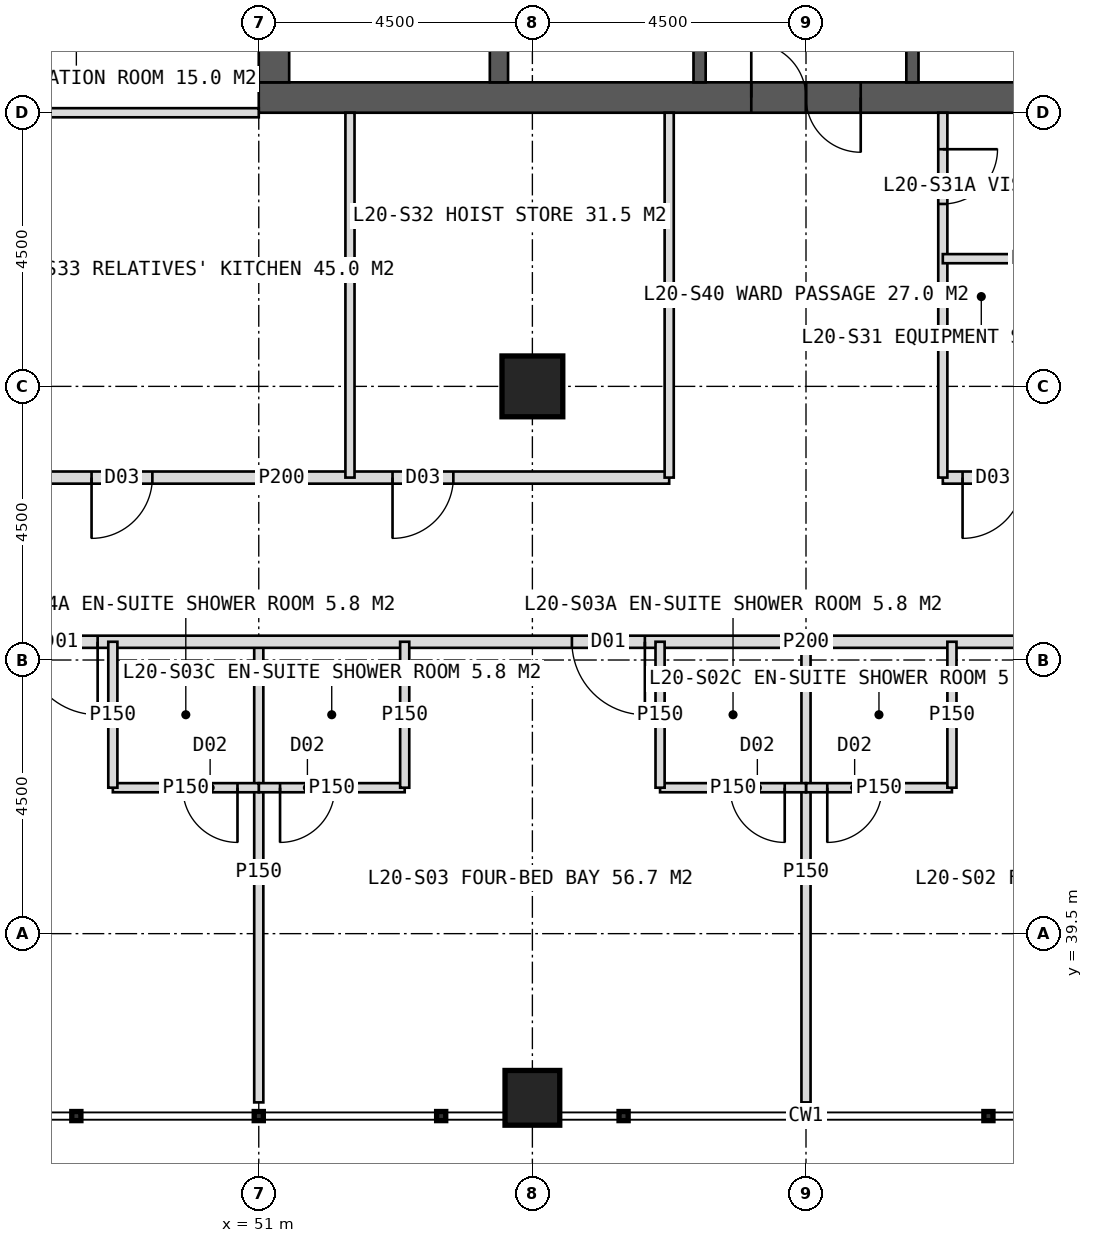
"""IFC4 building model, lengths in metres.
Left out: names, types, materials, properties, quantities, classifications, styles, units other than length and angle.
Written with IfcOpenShell. Run it as: python <this file> out.ifc"""

import sys

from ifc_helpers import new_model, si_unit, direction, frame, frame_2d, origin, origin_2d, place, context, subcontext, project, spatial, rectangle, hollow_rectangle, extrude, element, fill, save


model = new_model("IFC4")
c1 = context("Model", 3, precision=1e-05, world=origin(), true_north=direction((0.0, 1.0)))
c2 = subcontext(c1, "Body", "Model", "MODEL_VIEW")
j1 = project(units=[si_unit("LENGTHUNIT", "METRE"), si_unit("PLANEANGLEUNIT", "RADIAN")], contexts=[c1])
p1 = place(None, origin())
s1 = spatial("IfcSite", under=j1, at=p1, CompositionType="ELEMENT")
p2 = place(p1, origin())
s2 = spatial("IfcBuilding", under=s1, at=p2, CompositionType="ELEMENT")
p3 = place(p2, frame((0.0, 0.0, 87.0)))
s3 = spatial("IfcBuildingStorey", under=s2, at=p3, CompositionType="ELEMENT", Elevation=87.0)
p4 = place(p3, frame((51.0, 53.25, 0.0), z_axis=(0.0, 0.0, 1.0), x_axis=(1.0, 0.0, 0.0)))
e1 = element("IfcWall", 1, at=p4, inside=s3, PredefinedType="SHEAR", context=c2, shape_type="SweptSolid", body=[
    extrude(rectangle(XDim=18.0, YDim=0.5, at=frame_2d((9.0, 0.0))), origin(), (0.0, 0.0, 1.0), 4.0),
])
p5 = place(p4, frame((8.1, 0.0, 0.0)))
e2 = element("IfcOpeningElement", 2, at=p5, cuts=e1, PredefinedType="OPENING", context=c2, shape_type="SweptSolid", body=[
    extrude(rectangle(XDim=1.8, YDim=2.2, at=frame_2d((0.9, 1.1))), frame((0.0, 0.26, 0.0), z_axis=(0.0, -1.0, 0.0), x_axis=(1.0, 0.0, 0.0)), (0.0, 0.0, 1.0), 0.52),
])
p6 = place(p3, frame((51.25, 53.5, 0.0), z_axis=(0.0, 0.0, 1.0), x_axis=(0.0, 1.0, 0.0)))
e3 = element("IfcWall", 3, at=p6, inside=s3, PredefinedType="SHEAR", context=c2, shape_type="SweptSolid", body=[
    extrude(rectangle(XDim=17.0, YDim=0.5, at=frame_2d((8.5, 0.0))), origin(), (0.0, 0.0, 1.0), 4.0),
])
p7 = place(p6, frame((6.0, 0.0, 0.0)))
e4 = element("IfcOpeningElement", 4, at=p7, cuts=e3, PredefinedType="OPENING", context=c2, shape_type="SweptSolid", body=[
    extrude(rectangle(XDim=1.5, YDim=2.2, at=frame_2d((0.75, 1.1))), frame((0.0, 0.26, 0.0), z_axis=(0.0, -1.0, 0.0), x_axis=(1.0, 0.0, 0.0)), (0.0, 0.0, 1.0), 0.52),
])
p8 = place(p3, frame((54.95, 53.5, 0.0), z_axis=(0.0, 0.0, 1.0), x_axis=(0.0, 1.0, 0.0)))
e5 = element("IfcWall", 5, at=p8, inside=s3, PredefinedType="SHEAR", context=c2, shape_type="SweptSolid", body=[
    extrude(rectangle(XDim=17.0, YDim=0.3, at=frame_2d((8.5, 0.0))), origin(), (0.0, 0.0, 1.0), 4.0),
])
p9 = place(p3, frame((58.25, 53.5, 0.0), z_axis=(0.0, 0.0, 1.0), x_axis=(0.0, 1.0, 0.0)))
e6 = element("IfcWall", 6, at=p9, inside=s3, PredefinedType="SHEAR", context=c2, shape_type="SweptSolid", body=[
    extrude(rectangle(XDim=17.0, YDim=0.2, at=frame_2d((8.5, 0.0))), origin(), (0.0, 0.0, 1.0), 4.0),
])
p10 = place(p9, frame((1.375, 0.0, 0.0)))
e7 = element("IfcOpeningElement", 7, at=p10, cuts=e6, PredefinedType="OPENING", context=c2, shape_type="SweptSolid", body=[
    extrude(rectangle(XDim=1.4, YDim=2.2, at=frame_2d((0.7, 1.1))), frame((0.0, 0.11, 0.0), z_axis=(0.0, -1.0, 0.0), x_axis=(1.0, 0.0, 0.0)), (0.0, 0.0, 1.0), 0.22),
])
p11 = place(p9, frame((5.675, 0.0, 0.0)))
e8 = element("IfcOpeningElement", 8, at=p11, cuts=e6, PredefinedType="OPENING", context=c2, shape_type="SweptSolid", body=[
    extrude(rectangle(XDim=1.4, YDim=2.2, at=frame_2d((0.7, 1.1))), frame((0.0, 0.11, 0.0), z_axis=(0.0, -1.0, 0.0), x_axis=(1.0, 0.0, 0.0)), (0.0, 0.0, 1.0), 0.22),
])
p12 = place(p3, frame((61.75, 53.5, 0.0), z_axis=(0.0, 0.0, 1.0), x_axis=(0.0, 1.0, 0.0)))
e9 = element("IfcWall", 9, at=p12, inside=s3, PredefinedType="SHEAR", context=c2, shape_type="SweptSolid", body=[
    extrude(rectangle(XDim=17.0, YDim=0.2, at=frame_2d((8.5, 0.0))), origin(), (0.0, 0.0, 1.0), 4.0),
])
p13 = place(p12, frame((1.375, 0.0, 0.0)))
e10 = element("IfcOpeningElement", 10, at=p13, cuts=e9, PredefinedType="OPENING", context=c2, shape_type="SweptSolid", body=[
    extrude(rectangle(XDim=1.4, YDim=2.2, at=frame_2d((0.7, 1.1))), frame((0.0, 0.11, 0.0), z_axis=(0.0, -1.0, 0.0), x_axis=(1.0, 0.0, 0.0)), (0.0, 0.0, 1.0), 0.22),
])
p14 = place(p12, frame((5.675, 0.0, 0.0)))
e11 = element("IfcOpeningElement", 11, at=p14, cuts=e9, PredefinedType="OPENING", context=c2, shape_type="SweptSolid", body=[
    extrude(rectangle(XDim=1.4, YDim=2.2, at=frame_2d((0.7, 1.1))), frame((0.0, 0.11, 0.0), z_axis=(0.0, -1.0, 0.0), x_axis=(1.0, 0.0, 0.0)), (0.0, 0.0, 1.0), 0.22),
])
p15 = place(p3, frame((55.5, 48.5, 0.0), z_axis=(0.0, 0.0, 1.0), x_axis=(1.0, 0.0, 0.0)))
e12 = element("IfcColumn", 12, at=p15, inside=s3, PredefinedType="COLUMN", context=c2, shape_type="SweptSolid", body=[
    extrude(hollow_rectangle(XDim=1.0, YDim=1.0, WallThickness=0.1, at=origin_2d()), origin(), (0.0, 0.0, 1.0), 4.0),
])
p16 = place(p3, frame((55.5, 36.8, 0.0), z_axis=(0.0, 0.0, 1.0), x_axis=(1.0, 0.0, 0.0)))
e13 = element("IfcColumn", 13, at=p16, inside=s3, PredefinedType="COLUMN", context=c2, shape_type="SweptSolid", body=[
    extrude(hollow_rectangle(XDim=0.9, YDim=0.9, WallThickness=0.08, at=origin_2d()), origin(), (0.0, 0.0, 1.0), 4.0),
])
p17 = place(p3, frame((51.0, 53.0, 0.0), z_axis=(0.0, 0.0, 1.0), x_axis=(-1.0, 0.0, 0.0)))
e14 = element("IfcWall", 14, at=p17, inside=s3, PredefinedType="PARTITIONING", context=c2, shape_type="SweptSolid", body=[
    extrude(rectangle(XDim=6.0, YDim=0.15, at=frame_2d((3.0, 0.0))), origin(), (0.0, 0.0, 1.0), 3.75),
])
p18 = place(p3, frame((60.0, 44.3, 0.0), z_axis=(0.0, 0.0, 1.0), x_axis=(0.0, -1.0, 0.0)))
e15 = element("IfcWall", 15, at=p18, inside=s3, PredefinedType="PARTITIONING", context=c2, shape_type="SweptSolid", body=[
    extrude(rectangle(XDim=7.575, YDim=0.15, at=frame_2d((3.788, 0.0))), origin(), (0.0, 0.0, 1.0), 2.75),
])
p19 = place(p3, frame((51.0, 44.3, 0.0), z_axis=(0.0, 0.0, 1.0), x_axis=(0.0, -1.0, 0.0)))
e16 = element("IfcWall", 16, at=p19, inside=s3, PredefinedType="PARTITIONING", context=c2, shape_type="SweptSolid", body=[
    extrude(rectangle(XDim=7.575, YDim=0.15, at=frame_2d((3.788, 0.0))), origin(), (0.0, 0.0, 1.0), 3.75),
])
p20 = place(p3, frame((77.7, 44.3, 0.0), z_axis=(0.0, 0.0, 1.0), x_axis=(-1.0, 0.0, 0.0)))
e17 = element("IfcWall", 17, at=p20, inside=s3, PredefinedType="PARTITIONING", context=c2, shape_type="SweptSolid", body=[
    extrude(rectangle(XDim=35.4, YDim=0.2, at=frame_2d((17.7, 0.0))), origin(), (0.0, 0.0, 1.0), 3.75),
])
p21 = place(p20, frame((2.65, 0.0, 0.0)))
e18 = element("IfcOpeningElement", 18, at=p21, cuts=e17, PredefinedType="OPENING", context=c2, shape_type="SweptSolid", body=[
    extrude(rectangle(XDim=1.2, YDim=2.2, at=frame_2d((0.6, 1.1))), frame((0.0, 0.11, 0.0), z_axis=(0.0, -1.0, 0.0), x_axis=(1.0, 0.0, 0.0)), (0.0, 0.0, 1.0), 0.22),
])
p22 = place(p20, frame((11.35, 0.0, 0.0)))
e19 = element("IfcOpeningElement", 19, at=p22, cuts=e17, PredefinedType="OPENING", context=c2, shape_type="SweptSolid", body=[
    extrude(rectangle(XDim=1.2, YDim=2.2, at=frame_2d((0.6, 1.1))), frame((0.0, 0.11, 0.0), z_axis=(0.0, -1.0, 0.0), x_axis=(1.0, 0.0, 0.0)), (0.0, 0.0, 1.0), 0.22),
])
p23 = place(p20, frame((20.35, 0.0, 0.0)))
e20 = element("IfcOpeningElement", 20, at=p23, cuts=e17, PredefinedType="OPENING", context=c2, shape_type="SweptSolid", body=[
    extrude(rectangle(XDim=1.2, YDim=2.2, at=frame_2d((0.6, 1.1))), frame((0.0, 0.11, 0.0), z_axis=(0.0, -1.0, 0.0), x_axis=(1.0, 0.0, 0.0)), (0.0, 0.0, 1.0), 0.22),
])
p24 = place(p20, frame((29.35, 0.0, 0.0)))
e21 = element("IfcOpeningElement", 21, at=p24, cuts=e17, PredefinedType="OPENING", context=c2, shape_type="SweptSolid", body=[
    extrude(rectangle(XDim=1.2, YDim=2.2, at=frame_2d((0.6, 1.1))), frame((0.0, 0.11, 0.0), z_axis=(0.0, -1.0, 0.0), x_axis=(1.0, 0.0, 0.0)), (0.0, 0.0, 1.0), 0.22),
])
p25 = place(p3, frame((62.4, 41.9, 0.0), z_axis=(0.0, 0.0, 1.0), x_axis=(-1.0, 0.0, 0.0)))
e22 = element("IfcWall", 22, at=p25, inside=s3, PredefinedType="PARTITIONING", context=c2, shape_type="SweptSolid", body=[
    extrude(rectangle(XDim=2.4, YDim=0.15, at=frame_2d((1.2, 0.0))), origin(), (0.0, 0.0, 1.0), 3.75),
])
p26 = place(p25, frame((1.15, 0.0, 0.0)))
e23 = element("IfcOpeningElement", 23, at=p26, cuts=e22, PredefinedType="OPENING", context=c2, shape_type="SweptSolid", body=[
    extrude(rectangle(XDim=0.9, YDim=2.1, at=frame_2d((0.45, 1.05))), frame((0.0, 0.085, 0.0), z_axis=(0.0, -1.0, 0.0), x_axis=(1.0, 0.0, 0.0)), (0.0, 0.0, 1.0), 0.17),
])
p27 = place(p3, frame((62.4, 44.3, 0.0), z_axis=(0.0, 0.0, 1.0), x_axis=(0.0, -1.0, 0.0)))
e24 = element("IfcWall", 24, at=p27, inside=s3, PredefinedType="PARTITIONING", context=c2, shape_type="SweptSolid", body=[
    extrude(rectangle(XDim=2.4, YDim=0.15, at=frame_2d((1.2, 0.0))), origin(), (0.0, 0.0, 1.0), 3.75),
])
p28 = place(p3, frame((60.0, 41.9, 0.0), z_axis=(0.0, 0.0, 1.0), x_axis=(-1.0, 0.0, 0.0)))
e25 = element("IfcWall", 25, at=p28, inside=s3, PredefinedType="PARTITIONING", context=c2, shape_type="SweptSolid", body=[
    extrude(rectangle(XDim=2.4, YDim=0.15, at=frame_2d((1.2, 0.0))), origin(), (0.0, 0.0, 1.0), 3.75),
])
p29 = place(p28, frame((0.35, 0.0, 0.0)))
e26 = element("IfcOpeningElement", 26, at=p29, cuts=e25, PredefinedType="OPENING", context=c2, shape_type="SweptSolid", body=[
    extrude(rectangle(XDim=0.9, YDim=2.1, at=frame_2d((0.45, 1.05))), frame((0.0, 0.085, 0.0), z_axis=(0.0, -1.0, 0.0), x_axis=(1.0, 0.0, 0.0)), (0.0, 0.0, 1.0), 0.17),
])
p30 = place(p3, frame((57.6, 44.3, 0.0), z_axis=(0.0, 0.0, 1.0), x_axis=(0.0, -1.0, 0.0)))
e27 = element("IfcWall", 27, at=p30, inside=s3, PredefinedType="PARTITIONING", context=c2, shape_type="SweptSolid", body=[
    extrude(rectangle(XDim=2.4, YDim=0.15, at=frame_2d((1.2, 0.0))), origin(), (0.0, 0.0, 1.0), 3.75),
])
p31 = place(p3, frame((53.4, 41.9, 0.0), z_axis=(0.0, 0.0, 1.0), x_axis=(-1.0, 0.0, 0.0)))
e28 = element("IfcWall", 28, at=p31, inside=s3, PredefinedType="PARTITIONING", context=c2, shape_type="SweptSolid", body=[
    extrude(rectangle(XDim=2.4, YDim=0.15, at=frame_2d((1.2, 0.0))), origin(), (0.0, 0.0, 1.0), 3.75),
])
p32 = place(p31, frame((1.15, 0.0, 0.0)))
e29 = element("IfcOpeningElement", 29, at=p32, cuts=e28, PredefinedType="OPENING", context=c2, shape_type="SweptSolid", body=[
    extrude(rectangle(XDim=0.9, YDim=2.1, at=frame_2d((0.45, 1.05))), frame((0.0, 0.085, 0.0), z_axis=(0.0, -1.0, 0.0), x_axis=(1.0, 0.0, 0.0)), (0.0, 0.0, 1.0), 0.17),
])
p33 = place(p3, frame((53.4, 44.3, 0.0), z_axis=(0.0, 0.0, 1.0), x_axis=(0.0, -1.0, 0.0)))
e30 = element("IfcWall", 30, at=p33, inside=s3, PredefinedType="PARTITIONING", context=c2, shape_type="SweptSolid", body=[
    extrude(rectangle(XDim=2.4, YDim=0.15, at=frame_2d((1.2, 0.0))), origin(), (0.0, 0.0, 1.0), 3.75),
])
p34 = place(p3, frame((51.0, 41.9, 0.0), z_axis=(0.0, 0.0, 1.0), x_axis=(-1.0, 0.0, 0.0)))
e31 = element("IfcWall", 31, at=p34, inside=s3, PredefinedType="PARTITIONING", context=c2, shape_type="SweptSolid", body=[
    extrude(rectangle(XDim=2.4, YDim=0.15, at=frame_2d((1.2, 0.0))), origin(), (0.0, 0.0, 1.0), 3.75),
])
p35 = place(p34, frame((0.35, 0.0, 0.0)))
e32 = element("IfcOpeningElement", 32, at=p35, cuts=e31, PredefinedType="OPENING", context=c2, shape_type="SweptSolid", body=[
    extrude(rectangle(XDim=0.9, YDim=2.1, at=frame_2d((0.45, 1.05))), frame((0.0, 0.085, 0.0), z_axis=(0.0, -1.0, 0.0), x_axis=(1.0, 0.0, 0.0)), (0.0, 0.0, 1.0), 0.17),
])
p36 = place(p3, frame((48.6, 44.3, 0.0), z_axis=(0.0, 0.0, 1.0), x_axis=(0.0, -1.0, 0.0)))
e33 = element("IfcWall", 33, at=p36, inside=s3, PredefinedType="PARTITIONING", context=c2, shape_type="SweptSolid", body=[
    extrude(rectangle(XDim=2.4, YDim=0.15, at=frame_2d((1.2, 0.0))), origin(), (0.0, 0.0, 1.0), 3.75),
])
p37 = place(p3, frame((75.0, 47.0, 0.0), z_axis=(0.0, 0.0, 1.0), x_axis=(-1.0, 0.0, 0.0)))
e34 = element("IfcWall", 34, at=p37, inside=s3, PredefinedType="PARTITIONING", context=c2, shape_type="SweptSolid", body=[
    extrude(rectangle(XDim=12.75, YDim=0.2, at=frame_2d((6.375, 0.0))), origin(), (0.0, 0.0, 1.0), 3.75),
])
p38 = place(p37, frame((7.0, 0.0, 0.0)))
e35 = element("IfcOpeningElement", 35, at=p38, cuts=e34, PredefinedType="OPENING", context=c2, shape_type="SweptSolid", body=[
    extrude(rectangle(XDim=1.0, YDim=2.1, at=frame_2d((0.5, 1.05))), frame((0.0, 0.11, 0.0), z_axis=(0.0, -1.0, 0.0), x_axis=(1.0, 0.0, 0.0)), (0.0, 0.0, 1.0), 0.22),
])
p39 = place(p37, frame((11.425, 0.0, 0.0)))
e36 = element("IfcOpeningElement", 36, at=p39, cuts=e34, PredefinedType="OPENING", context=c2, shape_type="SweptSolid", body=[
    extrude(rectangle(XDim=1.0, YDim=2.1, at=frame_2d((0.5, 1.05))), frame((0.0, 0.11, 0.0), z_axis=(0.0, -1.0, 0.0), x_axis=(1.0, 0.0, 0.0)), (0.0, 0.0, 1.0), 0.22),
])
p40 = place(p3, frame((57.75, 47.0, 0.0), z_axis=(0.0, 0.0, 1.0), x_axis=(-1.0, 0.0, 0.0)))
e37 = element("IfcWall", 37, at=p40, inside=s3, PredefinedType="PARTITIONING", context=c2, shape_type="SweptSolid", body=[
    extrude(rectangle(XDim=12.75, YDim=0.2, at=frame_2d((6.375, 0.0))), origin(), (0.0, 0.0, 1.0), 3.75),
])
p41 = place(p40, frame((3.55, 0.0, 0.0)))
e38 = element("IfcOpeningElement", 38, at=p41, cuts=e37, PredefinedType="OPENING", context=c2, shape_type="SweptSolid", body=[
    extrude(rectangle(XDim=1.0, YDim=2.1, at=frame_2d((0.5, 1.05))), frame((0.0, 0.11, 0.0), z_axis=(0.0, -1.0, 0.0), x_axis=(1.0, 0.0, 0.0)), (0.0, 0.0, 1.0), 0.22),
])
p42 = place(p40, frame((8.5, 0.0, 0.0)))
e39 = element("IfcOpeningElement", 39, at=p42, cuts=e37, PredefinedType="OPENING", context=c2, shape_type="SweptSolid", body=[
    extrude(rectangle(XDim=1.0, YDim=2.1, at=frame_2d((0.5, 1.05))), frame((0.0, 0.11, 0.0), z_axis=(0.0, -1.0, 0.0), x_axis=(1.0, 0.0, 0.0)), (0.0, 0.0, 1.0), 0.22),
])
p43 = place(p3, frame((62.25, 53.0, 0.0), z_axis=(0.0, 0.0, 1.0), x_axis=(0.0, -1.0, 0.0)))
e40 = element("IfcWall", 40, at=p43, inside=s3, PredefinedType="PARTITIONING", context=c2, shape_type="SweptSolid", body=[
    extrude(rectangle(XDim=6.0, YDim=0.15, at=frame_2d((3.0, 0.0))), origin(), (0.0, 0.0, 1.0), 3.75),
])
p44 = place(p43, frame((0.6, 0.0, 0.0)))
e41 = element("IfcOpeningElement", 41, at=p44, cuts=e40, PredefinedType="OPENING", context=c2, shape_type="SweptSolid", body=[
    extrude(rectangle(XDim=0.9, YDim=2.1, at=frame_2d((0.45, 1.05))), frame((0.0, 0.085, 0.0), z_axis=(0.0, -1.0, 0.0), x_axis=(1.0, 0.0, 0.0)), (0.0, 0.0, 1.0), 0.17),
])
for number, where, z_axis, x_axis in (
    (42, (57.75, 53.0, 0.0), (0.0, 0.0, 1.0), (0.0, -1.0, 0.0)),
    (43, (52.5, 53.0, 0.0), (0.0, 0.0, 1.0), (0.0, -1.0, 0.0)),
):
    element("IfcWall", number, at=place(p3, frame(where, z_axis=z_axis, x_axis=x_axis)), inside=s3, PredefinedType="PARTITIONING", context=c2, shape_type="SweptSolid", body=[
        extrude(rectangle(XDim=6.0, YDim=0.15, at=frame_2d((3.0, 0.0))), origin(), (0.0, 0.0, 1.0), 3.75),
    ])
p45 = place(p3, frame((65.25, 50.6, 0.0), z_axis=(0.0, 0.0, 1.0), x_axis=(-1.0, 0.0, 0.0)))
e44 = element("IfcWall", 44, at=p45, inside=s3, PredefinedType="PARTITIONING", context=c2, shape_type="SweptSolid", body=[
    extrude(rectangle(XDim=3.0, YDim=0.15, at=frame_2d((1.5, 0.0))), origin(), (0.0, 0.0, 1.0), 3.75),
])
p46 = place(p26, origin())
e45 = element("IfcDoor", 45, at=p46, inside=s3, OperationType="SINGLE_SWING_RIGHT", PredefinedType="DOOR", context=c2, shape_type="SweptSolid", body=[
    extrude(rectangle(XDim=0.9, YDim=2.1, at=frame_2d((0.45, 1.05))), frame((0.0, 0.025, 0.0), z_axis=(0.0, -1.0, 0.0), x_axis=(1.0, 0.0, 0.0)), (0.0, 0.0, 1.0), 0.05),
])
fill(e23, e45)
p47 = place(p23, origin())
e46 = element("IfcDoor", 46, at=p47, inside=s3, OperationType="SINGLE_SWING_LEFT", PredefinedType="DOOR", context=c2, shape_type="SweptSolid", body=[
    extrude(rectangle(XDim=1.2, YDim=2.2, at=frame_2d((0.6, 1.1))), frame((0.0, 0.025, 0.0), z_axis=(0.0, -1.0, 0.0), x_axis=(1.0, 0.0, 0.0)), (0.0, 0.0, 1.0), 0.05),
])
fill(e20, e46)
p48 = place(p29, origin())
e47 = element("IfcDoor", 47, at=p48, inside=s3, OperationType="SINGLE_SWING_LEFT", PredefinedType="DOOR", context=c2, shape_type="SweptSolid", body=[
    extrude(rectangle(XDim=0.9, YDim=2.1, at=frame_2d((0.45, 1.05))), frame((0.0, 0.025, 0.0), z_axis=(0.0, -1.0, 0.0), x_axis=(1.0, 0.0, 0.0)), (0.0, 0.0, 1.0), 0.05),
])
fill(e26, e47)
p49 = place(p32, origin())
e48 = element("IfcDoor", 48, at=p49, inside=s3, OperationType="SINGLE_SWING_RIGHT", PredefinedType="DOOR", context=c2, shape_type="SweptSolid", body=[
    extrude(rectangle(XDim=0.9, YDim=2.1, at=frame_2d((0.45, 1.05))), frame((0.0, 0.025, 0.0), z_axis=(0.0, -1.0, 0.0), x_axis=(1.0, 0.0, 0.0)), (0.0, 0.0, 1.0), 0.05),
])
fill(e29, e48)
p50 = place(p24, origin())
e49 = element("IfcDoor", 49, at=p50, inside=s3, OperationType="SINGLE_SWING_LEFT", PredefinedType="DOOR", context=c2, shape_type="SweptSolid", body=[
    extrude(rectangle(XDim=1.2, YDim=2.2, at=frame_2d((0.6, 1.1))), frame((0.0, 0.025, 0.0), z_axis=(0.0, -1.0, 0.0), x_axis=(1.0, 0.0, 0.0)), (0.0, 0.0, 1.0), 0.05),
])
fill(e21, e49)
p51 = place(p35, origin())
e50 = element("IfcDoor", 50, at=p51, inside=s3, OperationType="SINGLE_SWING_LEFT", PredefinedType="DOOR", context=c2, shape_type="SweptSolid", body=[
    extrude(rectangle(XDim=0.9, YDim=2.1, at=frame_2d((0.45, 1.05))), frame((0.0, 0.025, 0.0), z_axis=(0.0, -1.0, 0.0), x_axis=(1.0, 0.0, 0.0)), (0.0, 0.0, 1.0), 0.05),
])
fill(e32, e50)
p52 = place(p44, origin())
e51 = element("IfcDoor", 51, at=p52, inside=s3, OperationType="SINGLE_SWING_LEFT", PredefinedType="DOOR", context=c2, shape_type="SweptSolid", body=[
    extrude(rectangle(XDim=0.9, YDim=2.1, at=frame_2d((0.45, 1.05))), frame((0.0, 0.025, 0.0), z_axis=(0.0, -1.0, 0.0), x_axis=(1.0, 0.0, 0.0)), (0.0, 0.0, 1.0), 0.05),
])
fill(e41, e51)
p53 = place(p39, origin())
e52 = element("IfcDoor", 52, at=p53, inside=s3, OperationType="SINGLE_SWING_RIGHT", PredefinedType="DOOR", context=c2, shape_type="SweptSolid", body=[
    extrude(rectangle(XDim=1.0, YDim=2.1, at=frame_2d((0.5, 1.05))), frame((0.0, 0.025, 0.0), z_axis=(0.0, -1.0, 0.0), x_axis=(1.0, 0.0, 0.0)), (0.0, 0.0, 1.0), 0.05),
])
fill(e36, e52)
p54 = place(p41, origin())
e53 = element("IfcDoor", 53, at=p54, inside=s3, OperationType="SINGLE_SWING_RIGHT", PredefinedType="DOOR", context=c2, shape_type="SweptSolid", body=[
    extrude(rectangle(XDim=1.0, YDim=2.1, at=frame_2d((0.5, 1.05))), frame((0.0, 0.025, 0.0), z_axis=(0.0, -1.0, 0.0), x_axis=(1.0, 0.0, 0.0)), (0.0, 0.0, 1.0), 0.05),
])
fill(e38, e53)
p55 = place(p42, origin())
e54 = element("IfcDoor", 54, at=p55, inside=s3, OperationType="SINGLE_SWING_RIGHT", PredefinedType="DOOR", context=c2, shape_type="SweptSolid", body=[
    extrude(rectangle(XDim=1.0, YDim=2.1, at=frame_2d((0.5, 1.05))), frame((0.0, 0.025, 0.0), z_axis=(0.0, -1.0, 0.0), x_axis=(1.0, 0.0, 0.0)), (0.0, 0.0, 1.0), 0.05),
])
fill(e39, e54)
p56 = place(p5, origin())
e55 = element("IfcDoor", 55, at=p56, inside=s3, OperationType="DOUBLE_DOOR_SINGLE_SWING", PredefinedType="DOOR", context=c2, shape_type="SweptSolid", body=[
    extrude(rectangle(XDim=1.8, YDim=2.2, at=frame_2d((0.9, 1.1))), frame((0.0, 0.025, 0.0), z_axis=(0.0, -1.0, 0.0), x_axis=(1.0, 0.0, 0.0)), (0.0, 0.0, 1.0), 0.05),
])
fill(e2, e55)
save(model, sys.argv[1])
